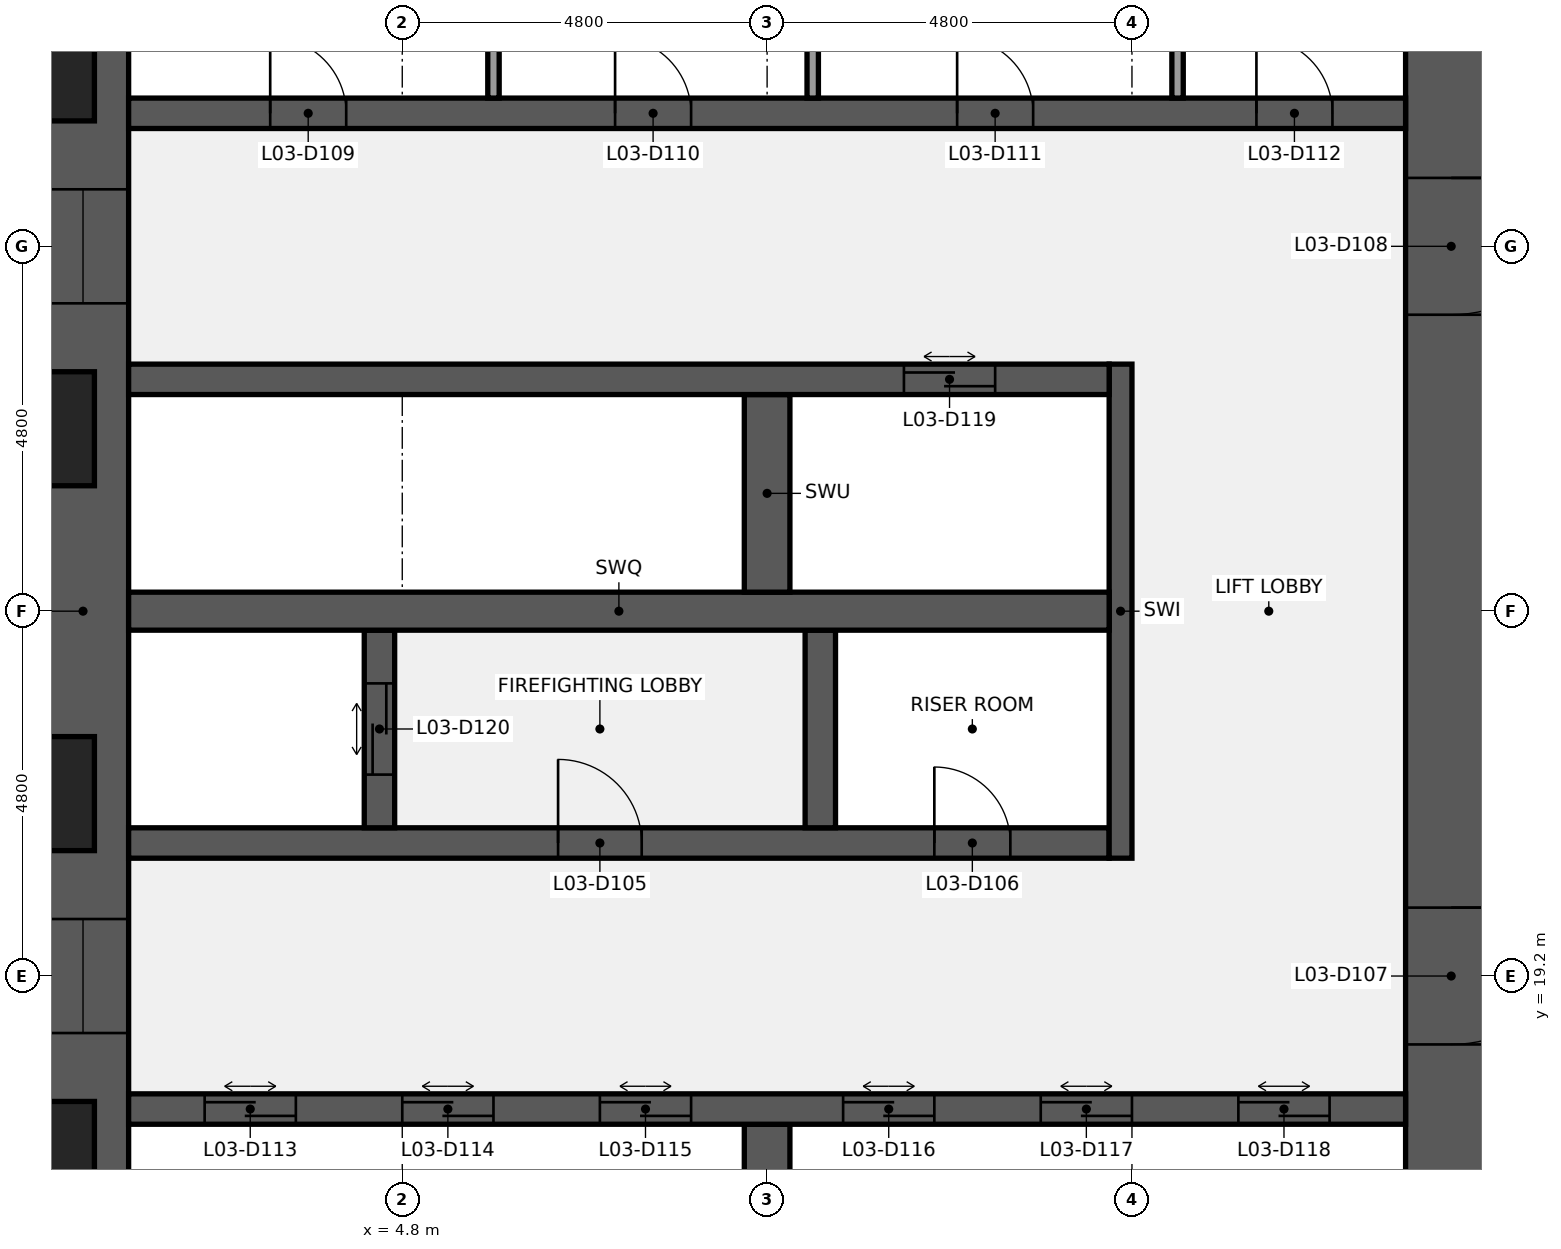
"""IFC4 building model, lengths in metres.
Left out: names, types, materials, properties, quantities, classifications, styles, units other than length and angle.
Written with IfcOpenShell. Run it as: python <this file> out.ifc"""

import sys

from ifc_helpers import new_model, si_unit, direction, frame, frame_2d, origin, place, context, subcontext, project, spatial, rectangle, extrude, element, fill, save


model = new_model("IFC4")
c1 = context("Model", 3, precision=1e-05, world=origin(), true_north=direction((0.0, 1.0)))
c2 = subcontext(c1, "Body", "Model", "MODEL_VIEW")
j1 = project(units=[si_unit("LENGTHUNIT", "METRE"), si_unit("PLANEANGLEUNIT", "RADIAN")], contexts=[c1])
p1 = place(None, origin())
s1 = spatial("IfcSite", under=j1, at=p1, CompositionType="ELEMENT")
p2 = place(p1, origin())
s2 = spatial("IfcBuilding", under=s1, at=p2, CompositionType="ELEMENT")
p3 = place(p2, frame((0.0, 0.0, 21.4)))
s3 = spatial("IfcBuildingStorey", under=s2, at=p3, CompositionType="ELEMENT", Elevation=21.4)
p4 = place(p3, frame((0.6, 9.6, 0.0), z_axis=(0.0, 0.0, 1.0), x_axis=(0.0, 1.0, 0.0)))
e1 = element("IfcWall", 1, at=p4, inside=s3, PredefinedType="SHEAR", context=c2, shape_type="SweptSolid", body=[
    extrude(rectangle(XDim=28.8, YDim=1.2, at=frame_2d((14.4, 0.0))), origin(), (0.0, 0.0, 1.0), 4.24),
])
p5 = place(p4, frame((8.85, 0.0, 0.9)))
e2 = element("IfcOpeningElement", 2, at=p5, cuts=e1, PredefinedType="OPENING", context=c2, shape_type="SweptSolid", body=[
    extrude(rectangle(XDim=1.5, YDim=1.5, at=frame_2d((0.75, 0.75))), frame((0.0, 0.61, 0.0), z_axis=(0.0, -1.0, 0.0), x_axis=(1.0, 0.0, 0.0)), (0.0, 0.0, 1.0), 1.22),
])
p6 = place(p4, frame((18.45, 0.0, 0.9)))
e3 = element("IfcOpeningElement", 3, at=p6, cuts=e1, PredefinedType="OPENING", context=c2, shape_type="SweptSolid", body=[
    extrude(rectangle(XDim=1.5, YDim=1.5, at=frame_2d((0.75, 0.75))), frame((0.0, 0.61, 0.0), z_axis=(0.0, -1.0, 0.0), x_axis=(1.0, 0.0, 0.0)), (0.0, 0.0, 1.0), 1.22),
])
p7 = place(p3, frame((18.6, 38.4, 0.0), z_axis=(0.0, 0.0, 1.0), x_axis=(0.0, -1.0, 0.0)))
e4 = element("IfcWall", 4, at=p7, inside=s3, PredefinedType="SHEAR", context=c2, shape_type="SweptSolid", body=[
    extrude(rectangle(XDim=28.8, YDim=1.2, at=frame_2d((14.4, 0.0))), origin(), (0.0, 0.0, 1.0), 4.24),
])
p8 = place(p7, frame((18.3, 0.0, 0.0)))
e5 = element("IfcOpeningElement", 5, at=p8, cuts=e4, PredefinedType="OPENING", context=c2, shape_type="SweptSolid", body=[
    extrude(rectangle(XDim=1.8, YDim=2.1, at=frame_2d((0.9, 1.05))), frame((0.0, 0.61, 0.0), z_axis=(0.0, -1.0, 0.0), x_axis=(1.0, 0.0, 0.0)), (0.0, 0.0, 1.0), 1.22),
])
p9 = place(p7, frame((8.7, 0.0, 0.0)))
e6 = element("IfcOpeningElement", 6, at=p9, cuts=e4, PredefinedType="OPENING", context=c2, shape_type="SweptSolid", body=[
    extrude(rectangle(XDim=1.8, YDim=2.1, at=frame_2d((0.9, 1.05))), frame((0.0, 0.61, 0.0), z_axis=(0.0, -1.0, 0.0), x_axis=(1.0, 0.0, 0.0)), (0.0, 0.0, 1.0), 1.22),
])
p10 = place(p3, frame((9.6, 14.65, 0.0), z_axis=(0.0, 0.0, 1.0), x_axis=(0.0, 1.0, 0.0)))
e7 = element("IfcWall", 7, at=p10, inside=s3, PredefinedType="SHEAR", context=c2, shape_type="SweptSolid", body=[
    extrude(rectangle(XDim=2.6, YDim=0.6, at=frame_2d((1.3, 0.0))), origin(), (0.0, 0.0, 1.0), 4.24),
])
p11 = place(p3, frame((1.2, 17.45, 0.0), z_axis=(0.0, 0.0, 1.0), x_axis=(1.0, 0.0, 0.0)))
e8 = element("IfcWall", 8, at=p11, inside=s3, PredefinedType="SHEAR", context=c2, shape_type="SweptSolid", body=[
    extrude(rectangle(XDim=16.8, YDim=0.4, at=frame_2d((8.4, 0.0))), origin(), (0.0, 0.0, 1.0), 4.24),
])
p12 = place(p11, frame((1.0, 0.0, 0.0)))
e9 = element("IfcOpeningElement", 9, at=p12, cuts=e8, PredefinedType="OPENING", context=c2, shape_type="SweptSolid", body=[
    extrude(rectangle(XDim=1.2, YDim=2.1, at=frame_2d((0.6, 1.05))), frame((0.0, 0.21, 0.0), z_axis=(0.0, -1.0, 0.0), x_axis=(1.0, 0.0, 0.0)), (0.0, 0.0, 1.0), 0.42),
])
p13 = place(p11, frame((3.6, 0.0, 0.0)))
e10 = element("IfcOpeningElement", 10, at=p13, cuts=e8, PredefinedType="OPENING", context=c2, shape_type="SweptSolid", body=[
    extrude(rectangle(XDim=1.2, YDim=2.1, at=frame_2d((0.6, 1.05))), frame((0.0, 0.21, 0.0), z_axis=(0.0, -1.0, 0.0), x_axis=(1.0, 0.0, 0.0)), (0.0, 0.0, 1.0), 0.42),
])
p14 = place(p11, frame((6.2, 0.0, 0.0)))
e11 = element("IfcOpeningElement", 11, at=p14, cuts=e8, PredefinedType="OPENING", context=c2, shape_type="SweptSolid", body=[
    extrude(rectangle(XDim=1.2, YDim=2.1, at=frame_2d((0.6, 1.05))), frame((0.0, 0.21, 0.0), z_axis=(0.0, -1.0, 0.0), x_axis=(1.0, 0.0, 0.0)), (0.0, 0.0, 1.0), 0.42),
])
p15 = place(p11, frame((9.4, 0.0, 0.0)))
e12 = element("IfcOpeningElement", 12, at=p15, cuts=e8, PredefinedType="OPENING", context=c2, shape_type="SweptSolid", body=[
    extrude(rectangle(XDim=1.2, YDim=2.1, at=frame_2d((0.6, 1.05))), frame((0.0, 0.21, 0.0), z_axis=(0.0, -1.0, 0.0), x_axis=(1.0, 0.0, 0.0)), (0.0, 0.0, 1.0), 0.42),
])
p16 = place(p11, frame((12.0, 0.0, 0.0)))
e13 = element("IfcOpeningElement", 13, at=p16, cuts=e8, PredefinedType="OPENING", context=c2, shape_type="SweptSolid", body=[
    extrude(rectangle(XDim=1.2, YDim=2.1, at=frame_2d((0.6, 1.05))), frame((0.0, 0.21, 0.0), z_axis=(0.0, -1.0, 0.0), x_axis=(1.0, 0.0, 0.0)), (0.0, 0.0, 1.0), 0.42),
])
p17 = place(p11, frame((14.6, 0.0, 0.0)))
e14 = element("IfcOpeningElement", 14, at=p17, cuts=e8, PredefinedType="OPENING", context=c2, shape_type="SweptSolid", body=[
    extrude(rectangle(XDim=1.2, YDim=2.1, at=frame_2d((0.6, 1.05))), frame((0.0, 0.21, 0.0), z_axis=(0.0, -1.0, 0.0), x_axis=(1.0, 0.0, 0.0)), (0.0, 0.0, 1.0), 0.42),
])
p18 = place(p3, frame((1.2, 20.95, 0.0), z_axis=(0.0, 0.0, 1.0), x_axis=(1.0, 0.0, 0.0)))
e15 = element("IfcWall", 15, at=p18, inside=s3, PredefinedType="SHEAR", context=c2, shape_type="SweptSolid", body=[
    extrude(rectangle(XDim=12.9, YDim=0.4, at=frame_2d((6.45, 0.0))), origin(), (0.0, 0.0, 1.0), 4.24),
])
p19 = place(p18, frame((5.65, 0.0, 0.0)))
e16 = element("IfcOpeningElement", 16, at=p19, cuts=e15, PredefinedType="OPENING", context=c2, shape_type="SweptSolid", body=[
    extrude(rectangle(XDim=1.1, YDim=2.1, at=frame_2d((0.55, 1.05))), frame((0.0, 0.21, 0.0), z_axis=(0.0, -1.0, 0.0), x_axis=(1.0, 0.0, 0.0)), (0.0, 0.0, 1.0), 0.42),
])
p20 = place(p18, frame((10.6, 0.0, 0.0)))
e17 = element("IfcOpeningElement", 17, at=p20, cuts=e15, PredefinedType="OPENING", context=c2, shape_type="SweptSolid", body=[
    extrude(rectangle(XDim=1.0, YDim=2.1, at=frame_2d((0.5, 1.05))), frame((0.0, 0.21, 0.0), z_axis=(0.0, -1.0, 0.0), x_axis=(1.0, 0.0, 0.0)), (0.0, 0.0, 1.0), 0.42),
])
p21 = place(p3, frame((14.25, 20.75, 0.0), z_axis=(0.0, 0.0, 1.0), x_axis=(0.0, 1.0, 0.0)))
e18 = element("IfcWall", 18, at=p21, inside=s3, PredefinedType="SHEAR", context=c2, shape_type="SweptSolid", body=[
    extrude(rectangle(XDim=6.5, YDim=0.3, at=frame_2d((3.25, 0.0))), origin(), (0.0, 0.0, 1.0), 4.24),
])
p22 = place(p3, frame((4.5, 21.15, 0.0), z_axis=(0.0, 0.0, 1.0), x_axis=(0.0, 1.0, 0.0)))
e19 = element("IfcWall", 19, at=p22, inside=s3, PredefinedType="SHEAR", context=c2, shape_type="SweptSolid", body=[
    extrude(rectangle(XDim=2.6, YDim=0.4, at=frame_2d((1.3, 0.0))), origin(), (0.0, 0.0, 1.0), 4.24),
])
p23 = place(p22, frame((0.7, 0.0, 0.0)))
e20 = element("IfcOpeningElement", 20, at=p23, cuts=e19, PredefinedType="OPENING", context=c2, shape_type="SweptSolid", body=[
    extrude(rectangle(XDim=1.2, YDim=2.1, at=frame_2d((0.6, 1.05))), frame((0.0, 0.21, 0.0), z_axis=(0.0, -1.0, 0.0), x_axis=(1.0, 0.0, 0.0)), (0.0, 0.0, 1.0), 0.42),
])
p24 = place(p3, frame((10.3, 21.15, 0.0), z_axis=(0.0, 0.0, 1.0), x_axis=(0.0, 1.0, 0.0)))
e21 = element("IfcWall", 21, at=p24, inside=s3, PredefinedType="SHEAR", context=c2, shape_type="SweptSolid", body=[
    extrude(rectangle(XDim=2.6, YDim=0.4, at=frame_2d((1.3, 0.0))), origin(), (0.0, 0.0, 1.0), 4.24),
])
p25 = place(p3, frame((1.2, 24.0, 0.0), z_axis=(0.0, 0.0, 1.0), x_axis=(1.0, 0.0, 0.0)))
e22 = element("IfcWall", 22, at=p25, inside=s3, PredefinedType="SHEAR", context=c2, shape_type="SweptSolid", body=[
    extrude(rectangle(XDim=12.9, YDim=0.5, at=frame_2d((6.45, 0.0))), origin(), (0.0, 0.0, 1.0), 4.24),
])
p26 = place(p3, frame((9.6, 24.25, 0.0), z_axis=(0.0, 0.0, 1.0), x_axis=(0.0, 1.0, 0.0)))
e23 = element("IfcWall", 23, at=p26, inside=s3, PredefinedType="SHEAR", context=c2, shape_type="SweptSolid", body=[
    extrude(rectangle(XDim=2.6, YDim=0.6, at=frame_2d((1.3, 0.0))), origin(), (0.0, 0.0, 1.0), 4.24),
])
p27 = place(p3, frame((1.2, 27.05, 0.0), z_axis=(0.0, 0.0, 1.0), x_axis=(1.0, 0.0, 0.0)))
e24 = element("IfcWall", 24, at=p27, inside=s3, PredefinedType="SHEAR", context=c2, shape_type="SweptSolid", body=[
    extrude(rectangle(XDim=12.9, YDim=0.4, at=frame_2d((6.45, 0.0))), origin(), (0.0, 0.0, 1.0), 4.24),
])
p28 = place(p27, frame((10.2, 0.0, 0.0)))
e25 = element("IfcOpeningElement", 25, at=p28, cuts=e24, PredefinedType="OPENING", context=c2, shape_type="SweptSolid", body=[
    extrude(rectangle(XDim=1.2, YDim=2.1, at=frame_2d((0.6, 1.05))), frame((0.0, 0.21, 0.0), z_axis=(0.0, -1.0, 0.0), x_axis=(1.0, 0.0, 0.0)), (0.0, 0.0, 1.0), 0.42),
])
p29 = place(p3, frame((1.2, 30.55, 0.0), z_axis=(0.0, 0.0, 1.0), x_axis=(1.0, 0.0, 0.0)))
e26 = element("IfcWall", 26, at=p29, inside=s3, PredefinedType="SHEAR", context=c2, shape_type="SweptSolid", body=[
    extrude(rectangle(XDim=16.8, YDim=0.4, at=frame_2d((8.4, 0.0))), origin(), (0.0, 0.0, 1.0), 4.24),
])
p30 = place(p29, frame((1.863, 0.0, 0.0)))
e27 = element("IfcOpeningElement", 27, at=p30, cuts=e26, PredefinedType="OPENING", context=c2, shape_type="SweptSolid", body=[
    extrude(rectangle(XDim=1.0, YDim=2.1, at=frame_2d((0.5, 1.05))), frame((0.0, 0.21, 0.0), z_axis=(0.0, -1.0, 0.0), x_axis=(1.0, 0.0, 0.0)), (0.0, 0.0, 1.0), 0.42),
])
p31 = place(p29, frame((6.4, 0.0, 0.0)))
e28 = element("IfcOpeningElement", 28, at=p31, cuts=e26, PredefinedType="OPENING", context=c2, shape_type="SweptSolid", body=[
    extrude(rectangle(XDim=1.0, YDim=2.1, at=frame_2d((0.5, 1.05))), frame((0.0, 0.21, 0.0), z_axis=(0.0, -1.0, 0.0), x_axis=(1.0, 0.0, 0.0)), (0.0, 0.0, 1.0), 0.42),
])
p32 = place(p29, frame((10.9, 0.0, 0.0)))
e29 = element("IfcOpeningElement", 29, at=p32, cuts=e26, PredefinedType="OPENING", context=c2, shape_type="SweptSolid", body=[
    extrude(rectangle(XDim=1.0, YDim=2.1, at=frame_2d((0.5, 1.05))), frame((0.0, 0.21, 0.0), z_axis=(0.0, -1.0, 0.0), x_axis=(1.0, 0.0, 0.0)), (0.0, 0.0, 1.0), 0.42),
])
p33 = place(p29, frame((14.837, 0.0, 0.0)))
e30 = element("IfcOpeningElement", 30, at=p33, cuts=e26, PredefinedType="OPENING", context=c2, shape_type="SweptSolid", body=[
    extrude(rectangle(XDim=1.0, YDim=2.1, at=frame_2d((0.5, 1.05))), frame((0.0, 0.21, 0.0), z_axis=(0.0, -1.0, 0.0), x_axis=(1.0, 0.0, 0.0)), (0.0, 0.0, 1.0), 0.42),
])
for number, where, z_axis, x_axis in (
    (31, (6.0, 30.75, 0.0), (0.0, 0.0, 1.0), (0.0, 1.0, 0.0)),
    (32, (10.2, 30.75, 0.0), (0.0, 0.0, 1.0), (0.0, 1.0, 0.0)),
    (33, (15.0, 30.75, 0.0), (0.0, 0.0, 1.0), (0.0, 1.0, 0.0)),
):
    element("IfcWall", number, at=place(p3, frame(where, z_axis=z_axis, x_axis=x_axis)), inside=s3, PredefinedType="PARTITIONING", context=c2, shape_type="SweptSolid", body=[
        extrude(rectangle(XDim=2.6, YDim=0.15, at=frame_2d((1.3, 0.0))), origin(), (0.0, 0.0, 1.0), 4.24),
    ])
p34 = place(p19, origin())
e34 = element("IfcDoor", 34, at=p34, inside=s3, OperationType="SINGLE_SWING_LEFT", PredefinedType="DOOR", context=c2, shape_type="SweptSolid", body=[
    extrude(rectangle(XDim=1.1, YDim=2.1, at=frame_2d((0.55, 1.05))), frame((0.0, 0.025, 0.0), z_axis=(0.0, -1.0, 0.0), x_axis=(1.0, 0.0, 0.0)), (0.0, 0.0, 1.0), 0.05),
])
fill(e16, e34)
p35 = place(p20, origin())
e35 = element("IfcDoor", 35, at=p35, inside=s3, OperationType="SINGLE_SWING_LEFT", PredefinedType="DOOR", context=c2, shape_type="SweptSolid", body=[
    extrude(rectangle(XDim=1.0, YDim=2.1, at=frame_2d((0.5, 1.05))), frame((0.0, 0.025, 0.0), z_axis=(0.0, -1.0, 0.0), x_axis=(1.0, 0.0, 0.0)), (0.0, 0.0, 1.0), 0.05),
])
fill(e17, e35)
p36 = place(p8, origin())
e36 = element("IfcDoor", 36, at=p36, inside=s3, OperationType="DOUBLE_DOOR_SINGLE_SWING", PredefinedType="DOOR", context=c2, shape_type="SweptSolid", body=[
    extrude(rectangle(XDim=1.8, YDim=2.1, at=frame_2d((0.9, 1.05))), frame((0.0, 0.025, 0.0), z_axis=(0.0, -1.0, 0.0), x_axis=(1.0, 0.0, 0.0)), (0.0, 0.0, 1.0), 0.05),
])
fill(e5, e36)
p37 = place(p9, origin())
e37 = element("IfcDoor", 37, at=p37, inside=s3, OperationType="DOUBLE_DOOR_SINGLE_SWING", PredefinedType="DOOR", context=c2, shape_type="SweptSolid", body=[
    extrude(rectangle(XDim=1.8, YDim=2.1, at=frame_2d((0.9, 1.05))), frame((0.0, 0.025, 0.0), z_axis=(0.0, -1.0, 0.0), x_axis=(1.0, 0.0, 0.0)), (0.0, 0.0, 1.0), 0.05),
])
fill(e6, e37)
p38 = place(p30, origin())
e38 = element("IfcDoor", 38, at=p38, inside=s3, OperationType="SINGLE_SWING_LEFT", PredefinedType="DOOR", context=c2, shape_type="SweptSolid", body=[
    extrude(rectangle(XDim=1.0, YDim=2.1, at=frame_2d((0.5, 1.05))), frame((0.0, 0.025, 0.0), z_axis=(0.0, -1.0, 0.0), x_axis=(1.0, 0.0, 0.0)), (0.0, 0.0, 1.0), 0.05),
])
fill(e27, e38)
p39 = place(p31, origin())
e39 = element("IfcDoor", 39, at=p39, inside=s3, OperationType="SINGLE_SWING_LEFT", PredefinedType="DOOR", context=c2, shape_type="SweptSolid", body=[
    extrude(rectangle(XDim=1.0, YDim=2.1, at=frame_2d((0.5, 1.05))), frame((0.0, 0.025, 0.0), z_axis=(0.0, -1.0, 0.0), x_axis=(1.0, 0.0, 0.0)), (0.0, 0.0, 1.0), 0.05),
])
fill(e28, e39)
p40 = place(p32, origin())
e40 = element("IfcDoor", 40, at=p40, inside=s3, OperationType="SINGLE_SWING_LEFT", PredefinedType="DOOR", context=c2, shape_type="SweptSolid", body=[
    extrude(rectangle(XDim=1.0, YDim=2.1, at=frame_2d((0.5, 1.05))), frame((0.0, 0.025, 0.0), z_axis=(0.0, -1.0, 0.0), x_axis=(1.0, 0.0, 0.0)), (0.0, 0.0, 1.0), 0.05),
])
fill(e29, e40)
p41 = place(p33, origin())
e41 = element("IfcDoor", 41, at=p41, inside=s3, OperationType="SINGLE_SWING_LEFT", PredefinedType="DOOR", context=c2, shape_type="SweptSolid", body=[
    extrude(rectangle(XDim=1.0, YDim=2.1, at=frame_2d((0.5, 1.05))), frame((0.0, 0.025, 0.0), z_axis=(0.0, -1.0, 0.0), x_axis=(1.0, 0.0, 0.0)), (0.0, 0.0, 1.0), 0.05),
])
fill(e30, e41)
p42 = place(p12, origin())
e42 = element("IfcDoor", 42, at=p42, inside=s3, OperationType="DOUBLE_DOOR_SLIDING", PredefinedType="DOOR", context=c2, shape_type="SweptSolid", body=[
    extrude(rectangle(XDim=1.2, YDim=2.1, at=frame_2d((0.6, 1.05))), frame((0.0, 0.025, 0.0), z_axis=(0.0, -1.0, 0.0), x_axis=(1.0, 0.0, 0.0)), (0.0, 0.0, 1.0), 0.05),
])
fill(e9, e42)
p43 = place(p13, origin())
e43 = element("IfcDoor", 43, at=p43, inside=s3, OperationType="DOUBLE_DOOR_SLIDING", PredefinedType="DOOR", context=c2, shape_type="SweptSolid", body=[
    extrude(rectangle(XDim=1.2, YDim=2.1, at=frame_2d((0.6, 1.05))), frame((0.0, 0.025, 0.0), z_axis=(0.0, -1.0, 0.0), x_axis=(1.0, 0.0, 0.0)), (0.0, 0.0, 1.0), 0.05),
])
fill(e10, e43)
p44 = place(p14, origin())
e44 = element("IfcDoor", 44, at=p44, inside=s3, OperationType="DOUBLE_DOOR_SLIDING", PredefinedType="DOOR", context=c2, shape_type="SweptSolid", body=[
    extrude(rectangle(XDim=1.2, YDim=2.1, at=frame_2d((0.6, 1.05))), frame((0.0, 0.025, 0.0), z_axis=(0.0, -1.0, 0.0), x_axis=(1.0, 0.0, 0.0)), (0.0, 0.0, 1.0), 0.05),
])
fill(e11, e44)
p45 = place(p15, origin())
e45 = element("IfcDoor", 45, at=p45, inside=s3, OperationType="DOUBLE_DOOR_SLIDING", PredefinedType="DOOR", context=c2, shape_type="SweptSolid", body=[
    extrude(rectangle(XDim=1.2, YDim=2.1, at=frame_2d((0.6, 1.05))), frame((0.0, 0.025, 0.0), z_axis=(0.0, -1.0, 0.0), x_axis=(1.0, 0.0, 0.0)), (0.0, 0.0, 1.0), 0.05),
])
fill(e12, e45)
p46 = place(p16, origin())
e46 = element("IfcDoor", 46, at=p46, inside=s3, OperationType="DOUBLE_DOOR_SLIDING", PredefinedType="DOOR", context=c2, shape_type="SweptSolid", body=[
    extrude(rectangle(XDim=1.2, YDim=2.1, at=frame_2d((0.6, 1.05))), frame((0.0, 0.025, 0.0), z_axis=(0.0, -1.0, 0.0), x_axis=(1.0, 0.0, 0.0)), (0.0, 0.0, 1.0), 0.05),
])
fill(e13, e46)
p47 = place(p17, origin())
e47 = element("IfcDoor", 47, at=p47, inside=s3, OperationType="DOUBLE_DOOR_SLIDING", PredefinedType="DOOR", context=c2, shape_type="SweptSolid", body=[
    extrude(rectangle(XDim=1.2, YDim=2.1, at=frame_2d((0.6, 1.05))), frame((0.0, 0.025, 0.0), z_axis=(0.0, -1.0, 0.0), x_axis=(1.0, 0.0, 0.0)), (0.0, 0.0, 1.0), 0.05),
])
fill(e14, e47)
p48 = place(p28, origin())
e48 = element("IfcDoor", 48, at=p48, inside=s3, OperationType="DOUBLE_DOOR_SLIDING", PredefinedType="DOOR", context=c2, shape_type="SweptSolid", body=[
    extrude(rectangle(XDim=1.2, YDim=2.1, at=frame_2d((0.6, 1.05))), frame((0.0, 0.025, 0.0), z_axis=(0.0, -1.0, 0.0), x_axis=(1.0, 0.0, 0.0)), (0.0, 0.0, 1.0), 0.05),
])
fill(e25, e48)
p49 = place(p23, origin())
e49 = element("IfcDoor", 49, at=p49, inside=s3, OperationType="DOUBLE_DOOR_SLIDING", PredefinedType="DOOR", context=c2, shape_type="SweptSolid", body=[
    extrude(rectangle(XDim=1.2, YDim=2.1, at=frame_2d((0.6, 1.05))), frame((0.0, 0.025, 0.0), z_axis=(0.0, -1.0, 0.0), x_axis=(1.0, 0.0, 0.0)), (0.0, 0.0, 1.0), 0.05),
])
fill(e20, e49)
p50 = place(p5, origin())
e50 = element("IfcWindow", 50, at=p50, inside=s3, PartitioningType="SINGLE_PANEL", PredefinedType="WINDOW", context=c2, shape_type="SweptSolid", body=[
    extrude(rectangle(XDim=1.5, YDim=1.5, at=frame_2d((0.75, 0.75))), frame((0.0, 0.03, 0.0), z_axis=(0.0, -1.0, 0.0), x_axis=(1.0, 0.0, 0.0)), (0.0, 0.0, 1.0), 0.06),
])
fill(e2, e50)
p51 = place(p6, origin())
e51 = element("IfcWindow", 51, at=p51, inside=s3, PartitioningType="SINGLE_PANEL", PredefinedType="WINDOW", context=c2, shape_type="SweptSolid", body=[
    extrude(rectangle(XDim=1.5, YDim=1.5, at=frame_2d((0.75, 0.75))), frame((0.0, 0.03, 0.0), z_axis=(0.0, -1.0, 0.0), x_axis=(1.0, 0.0, 0.0)), (0.0, 0.0, 1.0), 0.06),
])
fill(e3, e51)
save(model, sys.argv[1])
